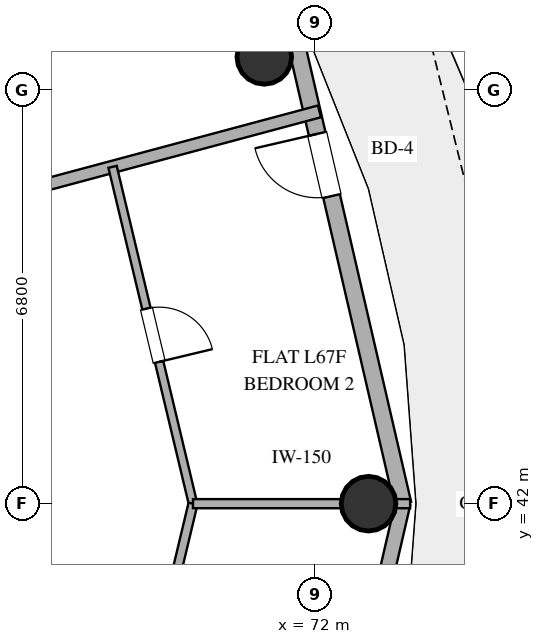
"""IFC4 building model, lengths in metres.
Left out: names, types, materials, properties, quantities, classifications, styles, units other than length and angle.
Written with IfcOpenShell. Run it as: python <this file> out.ifc"""

import sys

from ifc_helpers import new_model, si_unit, direction, frame, frame_2d, origin, origin_2d, place, context, subcontext, project, spatial, rectangle, hollow_circle, extrude, element, fill, save


model = new_model("IFC4")
c1 = context("Model", 3, precision=1e-05, world=origin(), true_north=direction((0.0, 1.0)))
c2 = subcontext(c1, "Body", "Model", "MODEL_VIEW")
j1 = project(units=[si_unit("LENGTHUNIT", "METRE"), si_unit("PLANEANGLEUNIT", "RADIAN")], contexts=[c1])
p1 = place(None, origin())
s1 = spatial("IfcSite", under=j1, at=p1, CompositionType="ELEMENT")
p2 = place(p1, origin())
s2 = spatial("IfcBuilding", under=s1, at=p2, CompositionType="ELEMENT")
p3 = place(p2, frame((0.0, 0.0, 262.2)))
s3 = spatial("IfcBuildingStorey", under=s2, at=p3, CompositionType="ELEMENT", Elevation=262.2)
for number, where, z_axis, x_axis in (
    (1, (72.883, 42.0, 0.0), (0.0, 0.0, 1.0), (1.0, 0.0, 0.0)),
    (2, (71.169, 49.347, 0.0), (0.0, 0.0, 1.0), (1.0, 0.0, 0.0)),
):
    element("IfcColumn", number, at=place(p3, frame(where, z_axis=z_axis, x_axis=x_axis)), inside=s3, PredefinedType="COLUMN", context=c2, shape_type="SweptSolid", body=[
        extrude(hollow_circle(Radius=0.45, WallThickness=0.025, at=origin_2d()), origin(), (0.0, 0.0, 1.0), 3.37),
    ])
p4 = place(p3, frame((73.447, 42.0, 0.0), z_axis=(0.0, 0.0, 1.0), x_axis=(-0.225635078214, 0.974211892495, 0.0)))
e3 = element("IfcWall", 3, at=p4, inside=s3, PredefinedType="SOLIDWALL", context=c2, shape_type="SweptSolid", body=[
    extrude(rectangle(XDim=7.77, YDim=0.28, at=frame_2d((3.885, 0.0))), origin(), (0.0, 0.0, 1.0), 3.37),
])
p5 = place(p4, frame((5.192, 0.0, 0.0)))
e4 = element("IfcOpeningElement", 4, at=p5, cuts=e3, PredefinedType="OPENING", context=c2, shape_type="SweptSolid", body=[
    extrude(rectangle(XDim=1.05, YDim=2.2, at=frame_2d((0.525, 1.1))), frame((0.0, 0.15, 0.0), z_axis=(0.0, -1.0, 0.0), x_axis=(1.0, 0.0, 0.0)), (0.0, 0.0, 1.0), 0.3),
])
p6 = place(p3, frame((71.694, 34.43, 0.0), z_axis=(0.0, 0.0, 1.0), x_axis=(0.225635078214, 0.974211892495, 0.0)))
e5 = element("IfcWall", 5, at=p6, inside=s3, PredefinedType="SOLIDWALL", context=c2, shape_type="SweptSolid", body=[
    extrude(rectangle(XDim=7.77, YDim=0.25, at=frame_2d((3.885, 0.0))), origin(), (0.0, 0.0, 1.0), 3.37),
])
p7 = place(p6, frame((5.091, 0.0, 1.42)))
e6 = element("IfcOpeningElement", 6, at=p7, cuts=e5, PredefinedType="OPENING", context=c2, shape_type="SweptSolid", body=[
    extrude(rectangle(XDim=1.0, YDim=1.05, at=frame_2d((0.5, 0.525))), frame((0.0, 0.135, 0.0), z_axis=(0.0, -1.0, 0.0), x_axis=(1.0, 0.0, 0.0)), (0.0, 0.0, 1.0), 0.27),
])
p8 = place(p3, frame((72.076, 48.451, 0.0), z_axis=(0.0, 0.0, 1.0), x_axis=(-0.965923661364, -0.258827124578, 0.0)))
e7 = element("IfcWall", 7, at=p8, inside=s3, PredefinedType="PARTITIONING", context=c2, shape_type="SweptSolid", body=[
    extrude(rectangle(XDim=11.26, YDim=0.2, at=frame_2d((5.63, 0.0))), origin(), (0.0, 0.0, 1.0), 2.73),
])
p9 = place(p3, frame((68.673, 47.539, 0.0), z_axis=(0.0, 0.0, 1.0), x_axis=(0.232304342064, -0.972643147644, 0.0)))
e8 = element("IfcWall", 8, at=p9, inside=s3, PredefinedType="PARTITIONING", context=c2, shape_type="SweptSolid", body=[
    extrude(rectangle(XDim=5.695, YDim=0.14, at=frame_2d((2.848, 0.0))), origin(), (0.0, 0.0, 1.0), 2.73),
])
p10 = place(p9, frame((2.398, 0.0, 0.0)))
e9 = element("IfcOpeningElement", 9, at=p10, cuts=e8, PredefinedType="OPENING", context=c2, shape_type="SweptSolid", body=[
    extrude(rectangle(XDim=0.9, YDim=2.1, at=frame_2d((0.45, 1.05))), frame((0.0, 0.08, 0.0), z_axis=(0.0, -1.0, 0.0), x_axis=(1.0, 0.0, 0.0)), (0.0, 0.0, 1.0), 0.16),
])
p11 = place(p3, frame((69.061, 38.084, 0.0), z_axis=(0.0, 0.0, 1.0), x_axis=(0.232333768072, 0.972636119118, 0.0)))
e10 = element("IfcWall", 10, at=p11, inside=s3, PredefinedType="PARTITIONING", context=c2, shape_type="SweptSolid", body=[
    extrude(rectangle(XDim=4.026, YDim=0.15, at=frame_2d((2.013, 0.0))), origin(), (0.0, 0.0, 1.0), 2.73),
])
p12 = place(p11, frame((1.563, 0.0, 0.0)))
e11 = element("IfcOpeningElement", 11, at=p12, cuts=e10, PredefinedType="OPENING", context=c2, shape_type="SweptSolid", body=[
    extrude(rectangle(XDim=0.9, YDim=2.1, at=frame_2d((0.45, 1.05))), frame((0.0, 0.085, 0.0), z_axis=(0.0, -1.0, 0.0), x_axis=(1.0, 0.0, 0.0)), (0.0, 0.0, 1.0), 0.17),
])
p13 = place(p3, frame((69.996, 42.0, 0.0), z_axis=(0.0, 0.0, 1.0), x_axis=(1.0, 0.0, 0.0)))
e12 = element("IfcWall", 12, at=p13, inside=s3, PredefinedType="PARTITIONING", context=c2, shape_type="SweptSolid", body=[
    extrude(rectangle(XDim=3.571, YDim=0.15, at=frame_2d((1.785, 0.0))), origin(), (0.0, 0.0, 1.0), 2.73),
])
p14 = place(p5, origin())
e13 = element("IfcDoor", 13, at=p14, inside=s3, OperationType="SINGLE_SWING_RIGHT", PredefinedType="DOOR", context=c2, shape_type="SweptSolid", body=[
    extrude(rectangle(XDim=1.05, YDim=2.2, at=frame_2d((0.525, 1.1))), frame((0.0, 0.025, 0.0), z_axis=(0.0, -1.0, 0.0), x_axis=(1.0, 0.0, 0.0)), (0.0, 0.0, 1.0), 0.05),
])
fill(e4, e13)
p15 = place(p10, origin())
e14 = element("IfcDoor", 14, at=p15, inside=s3, OperationType="SINGLE_SWING_RIGHT", PredefinedType="DOOR", context=c2, shape_type="SweptSolid", body=[
    extrude(rectangle(XDim=0.9, YDim=2.1, at=frame_2d((0.45, 1.05))), frame((0.0, 0.025, 0.0), z_axis=(0.0, -1.0, 0.0), x_axis=(1.0, 0.0, 0.0)), (0.0, 0.0, 1.0), 0.05),
])
fill(e9, e14)
save(model, sys.argv[1])
